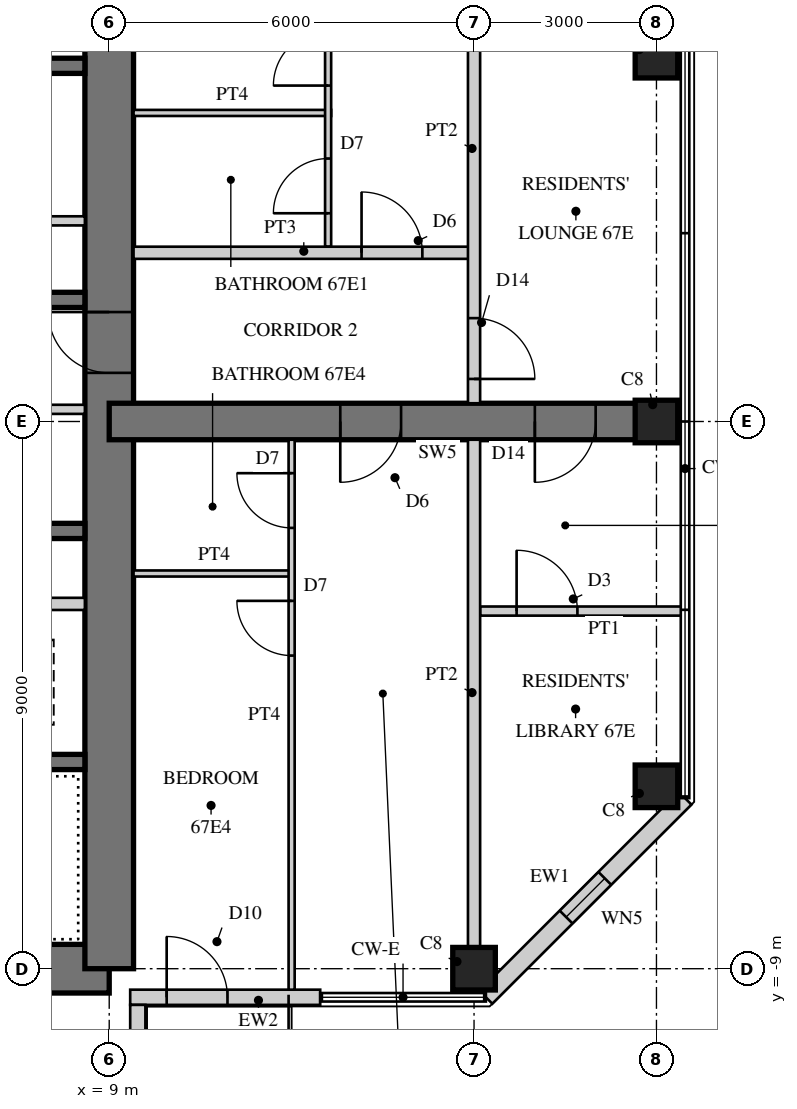
"""IFC4 building model, lengths in metres.
Left out: names, types, materials, properties, quantities, classifications, styles, units other than length and angle.
Written with IfcOpenShell. Run it as: python <this file> out.ifc"""

import sys

from ifc_helpers import new_model, si_unit, direction, frame, frame_2d, origin, origin_2d, place, context, subcontext, project, spatial, rectangle, hollow_rectangle, extrude, element, fill, save


model = new_model("IFC4")
c1 = context("Model", 3, precision=1e-05, world=origin(), true_north=direction((0.0, 1.0)))
c2 = subcontext(c1, "Body", "Model", "MODEL_VIEW")
j1 = project(units=[si_unit("LENGTHUNIT", "METRE"), si_unit("PLANEANGLEUNIT", "RADIAN")], contexts=[c1])
p1 = place(None, origin())
s1 = spatial("IfcSite", under=j1, at=p1, CompositionType="ELEMENT")
p2 = place(p1, origin())
s2 = spatial("IfcBuilding", under=s1, at=p2, CompositionType="ELEMENT")
p3 = place(p2, frame((0.0, 0.0, 261.1)))
s3 = spatial("IfcBuildingStorey", under=s2, at=p3, CompositionType="ELEMENT", Elevation=261.1)
p4 = place(p3, frame((-9.0, -9.0, 0.0), z_axis=(0.0, 0.0, 1.0), x_axis=(1.0, 0.0, 0.0)))
e1 = element("IfcWall", 1, at=p4, inside=s3, PredefinedType="SHEAR", context=c2, shape_type="SweptSolid", body=[
    extrude(rectangle(XDim=18.0, YDim=0.8, at=frame_2d((9.0, 0.0))), origin(), (0.0, 0.0, 1.0), 3.4),
])
p5 = place(p4, frame((9.8, 0.0, 0.0)))
e2 = element("IfcOpeningElement", 2, at=p5, cuts=e1, PredefinedType="OPENING", context=c2, shape_type="SweptSolid", body=[
    extrude(rectangle(XDim=1.0, YDim=2.4, at=frame_2d((0.5, 1.2))), frame((0.0, 0.41, 0.0), z_axis=(0.0, -1.0, 0.0), x_axis=(1.0, 0.0, 0.0)), (0.0, 0.0, 1.0), 0.82),
])
p6 = place(p3, frame((9.0, -9.0, 0.0), z_axis=(0.0, 0.0, 1.0), x_axis=(0.0, 1.0, 0.0)))
e3 = element("IfcWall", 3, at=p6, inside=s3, PredefinedType="SHEAR", context=c2, shape_type="SweptSolid", body=[
    extrude(rectangle(XDim=18.0, YDim=0.8, at=frame_2d((9.0, 0.0))), origin(), (0.0, 0.0, 1.0), 3.4),
])
p7 = place(p6, frame((9.8, 0.0, 0.0)))
e4 = element("IfcOpeningElement", 4, at=p7, cuts=e3, PredefinedType="OPENING", context=c2, shape_type="SweptSolid", body=[
    extrude(rectangle(XDim=1.0, YDim=2.4, at=frame_2d((0.5, 1.2))), frame((0.0, 0.41, 0.0), z_axis=(0.0, -1.0, 0.0), x_axis=(1.0, 0.0, 0.0)), (0.0, 0.0, 1.0), 0.82),
])
p8 = place(p3, frame((1.925, 2.0, 0.0), z_axis=(0.0, 0.0, 1.0), x_axis=(1.0, 0.0, 0.0)))
e5 = element("IfcWall", 5, at=p8, inside=s3, PredefinedType="SHEAR", context=c2, shape_type="SweptSolid", body=[
    extrude(rectangle(XDim=6.675, YDim=0.25, at=frame_2d((3.337, 0.0))), origin(), (0.0, 0.0, 1.0), 3.4),
])
p9 = place(p3, frame((1.925, 5.85, 0.0), z_axis=(0.0, 0.0, 1.0), x_axis=(1.0, 0.0, 0.0)))
e6 = element("IfcWall", 6, at=p9, inside=s3, PredefinedType="SHEAR", context=c2, shape_type="SweptSolid", body=[
    extrude(rectangle(XDim=6.675, YDim=0.25, at=frame_2d((3.337, 0.0))), origin(), (0.0, 0.0, 1.0), 3.4),
])
p10 = place(p9, frame((0.546, 0.0, 0.0)))
e7 = element("IfcOpeningElement", 7, at=p10, cuts=e6, PredefinedType="OPENING", context=c2, shape_type="SweptSolid", body=[
    extrude(rectangle(XDim=1.0, YDim=2.1, at=frame_2d((0.5, 1.05))), frame((0.0, 0.135, 0.0), z_axis=(0.0, -1.0, 0.0), x_axis=(1.0, 0.0, 0.0)), (0.0, 0.0, 1.0), 0.27),
])
p11 = place(p9, frame((2.837, 0.0, 0.0)))
e8 = element("IfcOpeningElement", 8, at=p11, cuts=e6, PredefinedType="OPENING", context=c2, shape_type="SweptSolid", body=[
    extrude(rectangle(XDim=1.0, YDim=2.1, at=frame_2d((0.5, 1.05))), frame((0.0, 0.135, 0.0), z_axis=(0.0, -1.0, 0.0), x_axis=(1.0, 0.0, 0.0)), (0.0, 0.0, 1.0), 0.27),
])
p12 = place(p3, frame((1.925, 3.3, 0.0), z_axis=(0.0, 0.0, 1.0), x_axis=(1.0, 0.0, 0.0)))
e9 = element("IfcWall", 9, at=p12, inside=s3, PredefinedType="PARTITIONING", context=c2, shape_type="SweptSolid", body=[
    extrude(rectangle(XDim=6.675, YDim=0.15, at=frame_2d((3.337, 0.0))), origin(), (0.0, 0.0, 1.0), 3.4),
])
p13 = place(p12, frame((0.075, 0.0, 0.0)))
e10 = element("IfcOpeningElement", 10, at=p13, cuts=e9, PredefinedType="OPENING", context=c2, shape_type="SweptSolid", body=[
    extrude(rectangle(XDim=0.8, YDim=2.1, at=frame_2d((0.4, 1.05))), frame((0.0, 0.085, 0.0), z_axis=(0.0, -1.0, 0.0), x_axis=(1.0, 0.0, 0.0)), (0.0, 0.0, 1.0), 0.17),
])
p14 = place(p12, frame((3.675, 0.0, 0.0)))
e11 = element("IfcOpeningElement", 11, at=p14, cuts=e9, PredefinedType="OPENING", context=c2, shape_type="SweptSolid", body=[
    extrude(rectangle(XDim=0.8, YDim=2.1, at=frame_2d((0.4, 1.05))), frame((0.0, 0.085, 0.0), z_axis=(0.0, -1.0, 0.0), x_axis=(1.0, 0.0, 0.0)), (0.0, 0.0, 1.0), 0.17),
])
p15 = place(p3, frame((2.125, -1.8, 0.0), z_axis=(0.0, 0.0, 1.0), x_axis=(1.0, 0.0, 0.0)))
e12 = element("IfcWall", 12, at=p15, inside=s3, PredefinedType="SHEAR", context=c2, shape_type="SweptSolid", body=[
    extrude(rectangle(XDim=6.475, YDim=0.25, at=frame_2d((3.238, 0.0))), origin(), (0.0, 0.0, 1.0), 3.4),
])
p16 = place(p3, frame((2.125, -5.6, 0.0), z_axis=(0.0, 0.0, 1.0), x_axis=(1.0, 0.0, 0.0)))
e13 = element("IfcWall", 13, at=p16, inside=s3, PredefinedType="SHEAR", context=c2, shape_type="SweptSolid", body=[
    extrude(rectangle(XDim=6.475, YDim=0.25, at=frame_2d((3.238, 0.0))), origin(), (0.0, 0.0, 1.0), 3.4),
])
p17 = place(p16, frame((0.175, 0.0, 0.0)))
e14 = element("IfcOpeningElement", 14, at=p17, cuts=e13, PredefinedType="OPENING", context=c2, shape_type="SweptSolid", body=[
    extrude(rectangle(XDim=1.0, YDim=2.1, at=frame_2d((0.5, 1.05))), frame((0.0, 0.135, 0.0), z_axis=(0.0, -1.0, 0.0), x_axis=(1.0, 0.0, 0.0)), (0.0, 0.0, 1.0), 0.27),
])
p18 = place(p3, frame((5.725, -3.0, 0.0), z_axis=(0.0, 0.0, 1.0), x_axis=(1.0, 0.0, 0.0)))
e15 = element("IfcWall", 15, at=p18, inside=s3, PredefinedType="PARTITIONING", context=c2, shape_type="SweptSolid", body=[
    extrude(rectangle(XDim=2.875, YDim=0.2, at=frame_2d((1.438, 0.0))), origin(), (0.0, 0.0, 1.0), 3.4),
])
p19 = place(p3, frame((9.0, 0.0, 0.0), z_axis=(0.0, 0.0, 1.0), x_axis=(1.0, 0.0, 0.0)))
e16 = element("IfcWall", 16, at=p19, inside=s3, PredefinedType="SHEAR", context=c2, shape_type="SweptSolid", body=[
    extrude(rectangle(XDim=9.0, YDim=0.6, at=frame_2d((4.5, 0.0))), origin(), (0.0, 0.0, 1.0), 3.4),
])
p20 = place(p19, frame((3.8, 0.0, 0.0)))
e17 = element("IfcOpeningElement", 17, at=p20, cuts=e16, PredefinedType="OPENING", context=c2, shape_type="SweptSolid", body=[
    extrude(rectangle(XDim=1.0, YDim=2.15, at=frame_2d((0.5, 1.075))), frame((0.0, 0.31, 0.0), z_axis=(0.0, -1.0, 0.0), x_axis=(1.0, 0.0, 0.0)), (0.0, 0.0, 1.0), 0.62),
])
p21 = place(p19, frame((7.0, 0.0, 0.0)))
e18 = element("IfcOpeningElement", 18, at=p21, cuts=e16, PredefinedType="OPENING", context=c2, shape_type="SweptSolid", body=[
    extrude(rectangle(XDim=1.0, YDim=2.2, at=frame_2d((0.5, 1.1))), frame((0.0, 0.31, 0.0), z_axis=(0.0, -1.0, 0.0), x_axis=(1.0, 0.0, 0.0)), (0.0, 0.0, 1.0), 0.62),
])
for number, where, z_axis, x_axis in (
    (19, (15.0, -9.0, 0.0), (0.0, 0.0, 1.0), (1.0, 0.0, 0.0)),
    (20, (18.0, -6.0, 0.0), (0.0, 0.0, 1.0), (1.0, 0.0, 0.0)),
    (21, (18.0, 0.0, 0.0), (0.0, 0.0, 1.0), (1.0, 0.0, 0.0)),
    (22, (18.0, 6.0, 0.0), (0.0, 0.0, 1.0), (1.0, 0.0, 0.0)),
):
    element("IfcColumn", number, at=place(p3, frame(where, z_axis=z_axis, x_axis=x_axis)), inside=s3, PredefinedType="COLUMN", context=c2, shape_type="SweptSolid", body=[
        extrude(rectangle(XDim=0.7, YDim=0.7, at=origin_2d()), origin(), (0.0, 0.0, 1.0), 3.4),
    ])
p22 = place(p3, frame((9.345, -9.47, 0.0), z_axis=(0.0, 0.0, 1.0), x_axis=(1.0, 0.0, 0.0)))
e23 = element("IfcWall", 23, at=p22, inside=s3, PredefinedType="SOLIDWALL", context=c2, shape_type="SweptSolid", body=[
    extrude(rectangle(XDim=3.125, YDim=0.25, at=frame_2d((1.562, 0.0))), origin(), (0.0, 0.0, 1.0), 3.22),
])
p23 = place(p22, frame((0.6, 0.0, 0.0)))
e24 = element("IfcOpeningElement", 24, at=p23, cuts=e23, PredefinedType="OPENING", context=c2, shape_type="SweptSolid", body=[
    extrude(rectangle(XDim=1.0, YDim=2.2, at=frame_2d((0.5, 1.1))), frame((0.0, 0.135, 0.0), z_axis=(0.0, -1.0, 0.0), x_axis=(1.0, 0.0, 0.0)), (0.0, 0.0, 1.0), 0.27),
])
p24 = place(p3, frame((15.195, -9.47, 0.0), z_axis=(0.0, 0.0, 1.0), x_axis=(0.707106781187, 0.707106781187, 0.0)))
e25 = element("IfcWall", 25, at=p24, inside=s3, PredefinedType="SOLIDWALL", context=c2, shape_type="SweptSolid", body=[
    extrude(rectangle(XDim=4.632, YDim=0.3, at=frame_2d((2.316, 0.0))), origin(), (0.0, 0.0, 1.0), 3.22),
])
p25 = place(p24, frame((1.866, 0.0, 0.3)))
e26 = element("IfcOpeningElement", 26, at=p25, cuts=e25, PredefinedType="OPENING", context=c2, shape_type="SweptSolid", body=[
    extrude(rectangle(XDim=0.9, YDim=2.4, at=frame_2d((0.45, 1.2))), frame((0.0, 0.16, 0.0), z_axis=(0.0, -1.0, 0.0), x_axis=(1.0, 0.0, 0.0)), (0.0, 0.0, 1.0), 0.32),
])
p26 = place(p3, frame((9.47, -12.47, 0.0), z_axis=(0.0, 0.0, 1.0), x_axis=(0.0, 1.0, 0.0)))
e27 = element("IfcWall", 27, at=p26, inside=s3, PredefinedType="SOLIDWALL", context=c2, shape_type="SweptSolid", body=[
    extrude(rectangle(XDim=2.875, YDim=0.25, at=frame_2d((1.438, 0.0))), origin(), (0.0, 0.0, 1.0), 3.22),
])
p27 = place(p26, frame((0.6, 0.0, 0.0)))
e28 = element("IfcOpeningElement", 28, at=p27, cuts=e27, PredefinedType="OPENING", context=c2, shape_type="SweptSolid", body=[
    extrude(rectangle(XDim=1.0, YDim=2.2, at=frame_2d((0.5, 1.1))), frame((0.0, 0.135, 0.0), z_axis=(0.0, -1.0, 0.0), x_axis=(1.0, 0.0, 0.0)), (0.0, 0.0, 1.0), 0.27),
])
p28 = place(p3, frame((2.325, 0.2, 0.0), z_axis=(0.0, 0.0, 1.0), x_axis=(1.0, 0.0, 0.0)))
e29 = element("IfcWall", 29, at=p28, inside=s3, PredefinedType="PARTITIONING", context=c2, shape_type="SweptSolid", body=[
    extrude(rectangle(XDim=6.275, YDim=0.15, at=frame_2d((3.138, 0.0))), origin(), (0.0, 0.0, 1.0), 3.22),
])
p29 = place(p28, frame((0.4, 0.0, 0.0)))
e30 = element("IfcOpeningElement", 30, at=p29, cuts=e29, PredefinedType="OPENING", context=c2, shape_type="SweptSolid", body=[
    extrude(rectangle(XDim=1.0, YDim=2.1, at=frame_2d((0.5, 1.05))), frame((0.0, 0.085, 0.0), z_axis=(0.0, -1.0, 0.0), x_axis=(1.0, 0.0, 0.0)), (0.0, 0.0, 1.0), 0.17),
])
p30 = place(p3, frame((9.4, 5.075, 0.0), z_axis=(0.0, 0.0, 1.0), x_axis=(1.0, 0.0, 0.0)))
e31 = element("IfcWall", 31, at=p30, inside=s3, PredefinedType="PARTITIONING", context=c2, shape_type="SweptSolid", body=[
    extrude(rectangle(XDim=3.25, YDim=0.1, at=frame_2d((1.625, 0.0))), origin(), (0.0, 0.0, 1.0), 3.22),
])
p31 = place(p3, frame((12.6, 2.875, 0.0), z_axis=(0.0, 0.0, 1.0), x_axis=(0.0, 1.0, 0.0)))
e32 = element("IfcWall", 32, at=p31, inside=s3, PredefinedType="PARTITIONING", context=c2, shape_type="SweptSolid", body=[
    extrude(rectangle(XDim=6.555, YDim=0.1, at=frame_2d((3.277, 0.0))), origin(), (0.0, 0.0, 1.0), 3.22),
])
p32 = place(p31, frame((0.55, 0.0, 0.0)))
e33 = element("IfcOpeningElement", 33, at=p32, cuts=e32, PredefinedType="OPENING", context=c2, shape_type="SweptSolid", body=[
    extrude(rectangle(XDim=0.9, YDim=2.1, at=frame_2d((0.45, 1.05))), frame((0.0, 0.06, 0.0), z_axis=(0.0, -1.0, 0.0), x_axis=(1.0, 0.0, 0.0)), (0.0, 0.0, 1.0), 0.12),
])
p33 = place(p31, frame((2.65, 0.0, 0.0)))
e34 = element("IfcOpeningElement", 34, at=p33, cuts=e32, PredefinedType="OPENING", context=c2, shape_type="SweptSolid", body=[
    extrude(rectangle(XDim=0.9, YDim=2.1, at=frame_2d((0.45, 1.05))), frame((0.0, 0.06, 0.0), z_axis=(0.0, -1.0, 0.0), x_axis=(1.0, 0.0, 0.0)), (0.0, 0.0, 1.0), 0.12),
])
p34 = place(p3, frame((9.4, -2.5, 0.0), z_axis=(0.0, 0.0, 1.0), x_axis=(1.0, 0.0, 0.0)))
e35 = element("IfcWall", 35, at=p34, inside=s3, PredefinedType="PARTITIONING", context=c2, shape_type="SweptSolid", body=[
    extrude(rectangle(XDim=2.65, YDim=0.1, at=frame_2d((1.325, 0.0))), origin(), (0.0, 0.0, 1.0), 3.22),
])
p35 = place(p3, frame((12.0, -9.345, 0.0), z_axis=(0.0, 0.0, 1.0), x_axis=(0.0, 1.0, 0.0)))
e36 = element("IfcWall", 36, at=p35, inside=s3, PredefinedType="PARTITIONING", context=c2, shape_type="SweptSolid", body=[
    extrude(rectangle(XDim=9.045, YDim=0.1, at=frame_2d((4.522, 0.0))), origin(), (0.0, 0.0, 1.0), 3.22),
])
p36 = place(p35, frame((5.495, 0.0, 0.0)))
e37 = element("IfcOpeningElement", 37, at=p36, cuts=e36, PredefinedType="OPENING", context=c2, shape_type="SweptSolid", body=[
    extrude(rectangle(XDim=0.9, YDim=2.1, at=frame_2d((0.45, 1.05))), frame((0.0, 0.06, 0.0), z_axis=(0.0, -1.0, 0.0), x_axis=(1.0, 0.0, 0.0)), (0.0, 0.0, 1.0), 0.12),
])
p37 = place(p35, frame((7.595, 0.0, 0.0)))
e38 = element("IfcOpeningElement", 38, at=p37, cuts=e36, PredefinedType="OPENING", context=c2, shape_type="SweptSolid", body=[
    extrude(rectangle(XDim=0.9, YDim=2.1, at=frame_2d((0.45, 1.05))), frame((0.0, 0.06, 0.0), z_axis=(0.0, -1.0, 0.0), x_axis=(1.0, 0.0, 0.0)), (0.0, 0.0, 1.0), 0.12),
])
p38 = place(p3, frame((9.4, 2.775, 0.0), z_axis=(0.0, 0.0, 1.0), x_axis=(1.0, 0.0, 0.0)))
e39 = element("IfcWall", 39, at=p38, inside=s3, PredefinedType="SOLIDWALL", context=c2, shape_type="SweptSolid", body=[
    extrude(rectangle(XDim=5.6, YDim=0.2, at=frame_2d((2.8, 0.0))), origin(), (0.0, 0.0, 1.0), 3.22),
])
p39 = place(p38, frame((3.75, 0.0, 0.0)))
e40 = element("IfcOpeningElement", 40, at=p39, cuts=e39, PredefinedType="OPENING", context=c2, shape_type="SweptSolid", body=[
    extrude(rectangle(XDim=1.0, YDim=2.15, at=frame_2d((0.5, 1.075))), frame((0.0, 0.11, 0.0), z_axis=(0.0, -1.0, 0.0), x_axis=(1.0, 0.0, 0.0)), (0.0, 0.0, 1.0), 0.22),
])
p40 = place(p3, frame((15.1, -3.118, 0.0), z_axis=(0.0, 0.0, 1.0), x_axis=(1.0, 0.0, 0.0)))
e41 = element("IfcWall", 41, at=p40, inside=s3, PredefinedType="PARTITIONING", context=c2, shape_type="SweptSolid", body=[
    extrude(rectangle(XDim=3.33, YDim=0.15, at=frame_2d((1.665, 0.0))), origin(), (0.0, 0.0, 1.0), 3.22),
])
p41 = place(p40, frame((0.6, 0.0, 0.0)))
e42 = element("IfcOpeningElement", 42, at=p41, cuts=e41, PredefinedType="OPENING", context=c2, shape_type="SweptSolid", body=[
    extrude(rectangle(XDim=1.0, YDim=2.1, at=frame_2d((0.5, 1.05))), frame((0.0, 0.085, 0.0), z_axis=(0.0, -1.0, 0.0), x_axis=(1.0, 0.0, 0.0)), (0.0, 0.0, 1.0), 0.17),
])
p42 = place(p3, frame((15.0, -8.65, 0.0), z_axis=(0.0, 0.0, 1.0), x_axis=(0.0, 1.0, 0.0)))
e43 = element("IfcWall", 43, at=p42, inside=s3, PredefinedType="SOLIDWALL", context=c2, shape_type="SweptSolid", body=[
    extrude(rectangle(XDim=8.35, YDim=0.2, at=frame_2d((4.175, 0.0))), origin(), (0.0, 0.0, 1.0), 2.52),
])
p43 = place(p3, frame((15.0, 0.3, 0.0), z_axis=(0.0, 0.0, 1.0), x_axis=(0.0, 1.0, 0.0)))
e44 = element("IfcWall", 44, at=p43, inside=s3, PredefinedType="SOLIDWALL", context=c2, shape_type="SweptSolid", body=[
    extrude(rectangle(XDim=8.35, YDim=0.2, at=frame_2d((4.175, 0.0))), origin(), (0.0, 0.0, 1.0), 2.52),
])
p44 = place(p43, frame((0.4, 0.0, 0.0)))
e45 = element("IfcOpeningElement", 45, at=p44, cuts=e44, PredefinedType="OPENING", context=c2, shape_type="SweptSolid", body=[
    extrude(rectangle(XDim=1.0, YDim=2.2, at=frame_2d((0.5, 1.1))), frame((0.0, 0.11, 0.0), z_axis=(0.0, -1.0, 0.0), x_axis=(1.0, 0.0, 0.0)), (0.0, 0.0, 1.0), 0.22),
])
p45 = place(p23, origin())
e46 = element("IfcDoor", 46, at=p45, inside=s3, OperationType="SINGLE_SWING_LEFT", PredefinedType="DOOR", context=c2, shape_type="SweptSolid", body=[
    extrude(hollow_rectangle(XDim=1.0, YDim=2.2, WallThickness=0.06, at=frame_2d((0.5, 1.1))), frame((0.0, 0.025, 0.0), z_axis=(0.0, -1.0, 0.0), x_axis=(1.0, 0.0, 0.0)), (0.0, 0.0, 1.0), 0.05),
    extrude(rectangle(XDim=0.879, YDim=2.079, at=frame_2d((0.5, 1.1))), frame((0.0, 0.025, 0.0), z_axis=(0.0, -1.0, 0.0), x_axis=(1.0, 0.0, 0.0)), (0.0, 0.0, 1.0), 0.05),
])
fill(e24, e46)
p46 = place(p25, origin())
e47 = element("IfcWindow", 47, at=p46, inside=s3, PartitioningType="SINGLE_PANEL", PredefinedType="WINDOW", context=c2, shape_type="SweptSolid", body=[
    extrude(hollow_rectangle(XDim=0.9, YDim=2.4, WallThickness=0.06, at=frame_2d((0.45, 1.2))), frame((0.0, 0.03, 0.0), z_axis=(0.0, -1.0, 0.0), x_axis=(1.0, 0.0, 0.0)), (0.0, 0.0, 1.0), 0.06),
    extrude(rectangle(XDim=0.779, YDim=2.279, at=frame_2d((0.45, 1.2))), frame((0.0, 0.03, 0.0), z_axis=(0.0, -1.0, 0.0), x_axis=(1.0, 0.0, 0.0)), (0.0, 0.0, 1.0), 0.06),
])
fill(e26, e47)
p47 = place(p32, origin())
e48 = element("IfcDoor", 48, at=p47, inside=s3, OperationType="SINGLE_SWING_LEFT", PredefinedType="DOOR", context=c2, shape_type="SweptSolid", body=[
    extrude(rectangle(XDim=0.9, YDim=2.1, at=frame_2d((0.45, 1.05))), frame((0.0, 0.025, 0.0), z_axis=(0.0, -1.0, 0.0), x_axis=(1.0, 0.0, 0.0)), (0.0, 0.0, 1.0), 0.05),
])
fill(e33, e48)
p48 = place(p33, origin())
e49 = element("IfcDoor", 49, at=p48, inside=s3, OperationType="SINGLE_SWING_LEFT", PredefinedType="DOOR", context=c2, shape_type="SweptSolid", body=[
    extrude(rectangle(XDim=0.9, YDim=2.1, at=frame_2d((0.45, 1.05))), frame((0.0, 0.025, 0.0), z_axis=(0.0, -1.0, 0.0), x_axis=(1.0, 0.0, 0.0)), (0.0, 0.0, 1.0), 0.05),
])
fill(e34, e49)
p49 = place(p36, origin())
e50 = element("IfcDoor", 50, at=p49, inside=s3, OperationType="SINGLE_SWING_RIGHT", PredefinedType="DOOR", context=c2, shape_type="SweptSolid", body=[
    extrude(rectangle(XDim=0.9, YDim=2.1, at=frame_2d((0.45, 1.05))), frame((0.0, 0.025, 0.0), z_axis=(0.0, -1.0, 0.0), x_axis=(1.0, 0.0, 0.0)), (0.0, 0.0, 1.0), 0.05),
])
fill(e37, e50)
p50 = place(p37, origin())
e51 = element("IfcDoor", 51, at=p50, inside=s3, OperationType="SINGLE_SWING_RIGHT", PredefinedType="DOOR", context=c2, shape_type="SweptSolid", body=[
    extrude(rectangle(XDim=0.9, YDim=2.1, at=frame_2d((0.45, 1.05))), frame((0.0, 0.025, 0.0), z_axis=(0.0, -1.0, 0.0), x_axis=(1.0, 0.0, 0.0)), (0.0, 0.0, 1.0), 0.05),
])
fill(e38, e51)
p51 = place(p39, origin())
e52 = element("IfcDoor", 52, at=p51, inside=s3, OperationType="SINGLE_SWING_LEFT", PredefinedType="DOOR", context=c2, shape_type="SweptSolid", body=[
    extrude(rectangle(XDim=1.0, YDim=2.15, at=frame_2d((0.5, 1.075))), frame((0.0, 0.025, 0.0), z_axis=(0.0, -1.0, 0.0), x_axis=(1.0, 0.0, 0.0)), (0.0, 0.0, 1.0), 0.05),
])
fill(e40, e52)
p52 = place(p41, origin())
e53 = element("IfcDoor", 53, at=p52, inside=s3, OperationType="SINGLE_SWING_LEFT", PredefinedType="DOOR", context=c2, shape_type="SweptSolid", body=[
    extrude(rectangle(XDim=1.0, YDim=2.1, at=frame_2d((0.5, 1.05))), frame((0.0, 0.025, 0.0), z_axis=(0.0, -1.0, 0.0), x_axis=(1.0, 0.0, 0.0)), (0.0, 0.0, 1.0), 0.05),
])
fill(e42, e53)
p53 = place(p44, frame((1.0, 0.0, 0.0), z_axis=(0.0, 0.0, 1.0), x_axis=(-1.0, 0.0, 0.0)))
e54 = element("IfcDoor", 54, at=p53, inside=s3, OperationType="SINGLE_SWING_RIGHT", PredefinedType="DOOR", context=c2, shape_type="SweptSolid", body=[
    extrude(rectangle(XDim=1.0, YDim=2.2, at=frame_2d((0.5, 1.1))), frame((0.0, 0.025, 0.0), z_axis=(0.0, -1.0, 0.0), x_axis=(1.0, 0.0, 0.0)), (0.0, 0.0, 1.0), 0.05),
])
fill(e45, e54)
p54 = place(p20, frame((1.0, 0.0, 0.0), z_axis=(0.0, 0.0, 1.0), x_axis=(-1.0, 0.0, 0.0)))
e55 = element("IfcDoor", 55, at=p54, inside=s3, OperationType="SINGLE_SWING_RIGHT", PredefinedType="DOOR", context=c2, shape_type="SweptSolid", body=[
    extrude(rectangle(XDim=1.0, YDim=2.15, at=frame_2d((0.5, 1.075))), frame((0.0, 0.025, 0.0), z_axis=(0.0, -1.0, 0.0), x_axis=(1.0, 0.0, 0.0)), (0.0, 0.0, 1.0), 0.05),
])
fill(e17, e55)
p55 = place(p21, frame((1.0, 0.0, 0.0), z_axis=(0.0, 0.0, 1.0), x_axis=(-1.0, 0.0, 0.0)))
e56 = element("IfcDoor", 56, at=p55, inside=s3, OperationType="SINGLE_SWING_RIGHT", PredefinedType="DOOR", context=c2, shape_type="SweptSolid", body=[
    extrude(rectangle(XDim=1.0, YDim=2.2, at=frame_2d((0.5, 1.1))), frame((0.0, 0.025, 0.0), z_axis=(0.0, -1.0, 0.0), x_axis=(1.0, 0.0, 0.0)), (0.0, 0.0, 1.0), 0.05),
])
fill(e18, e56)
p56 = place(p7, origin())
e57 = element("IfcDoor", 57, at=p56, inside=s3, OperationType="SINGLE_SWING_RIGHT", PredefinedType="DOOR", context=c2, shape_type="SweptSolid", body=[
    extrude(rectangle(XDim=1.0, YDim=2.4, at=frame_2d((0.5, 1.2))), frame((0.0, 0.055, 0.0), z_axis=(0.0, -1.0, 0.0), x_axis=(1.0, 0.0, 0.0)), (0.0, 0.0, 1.0), 0.05),
])
fill(e4, e57)
save(model, sys.argv[1])
